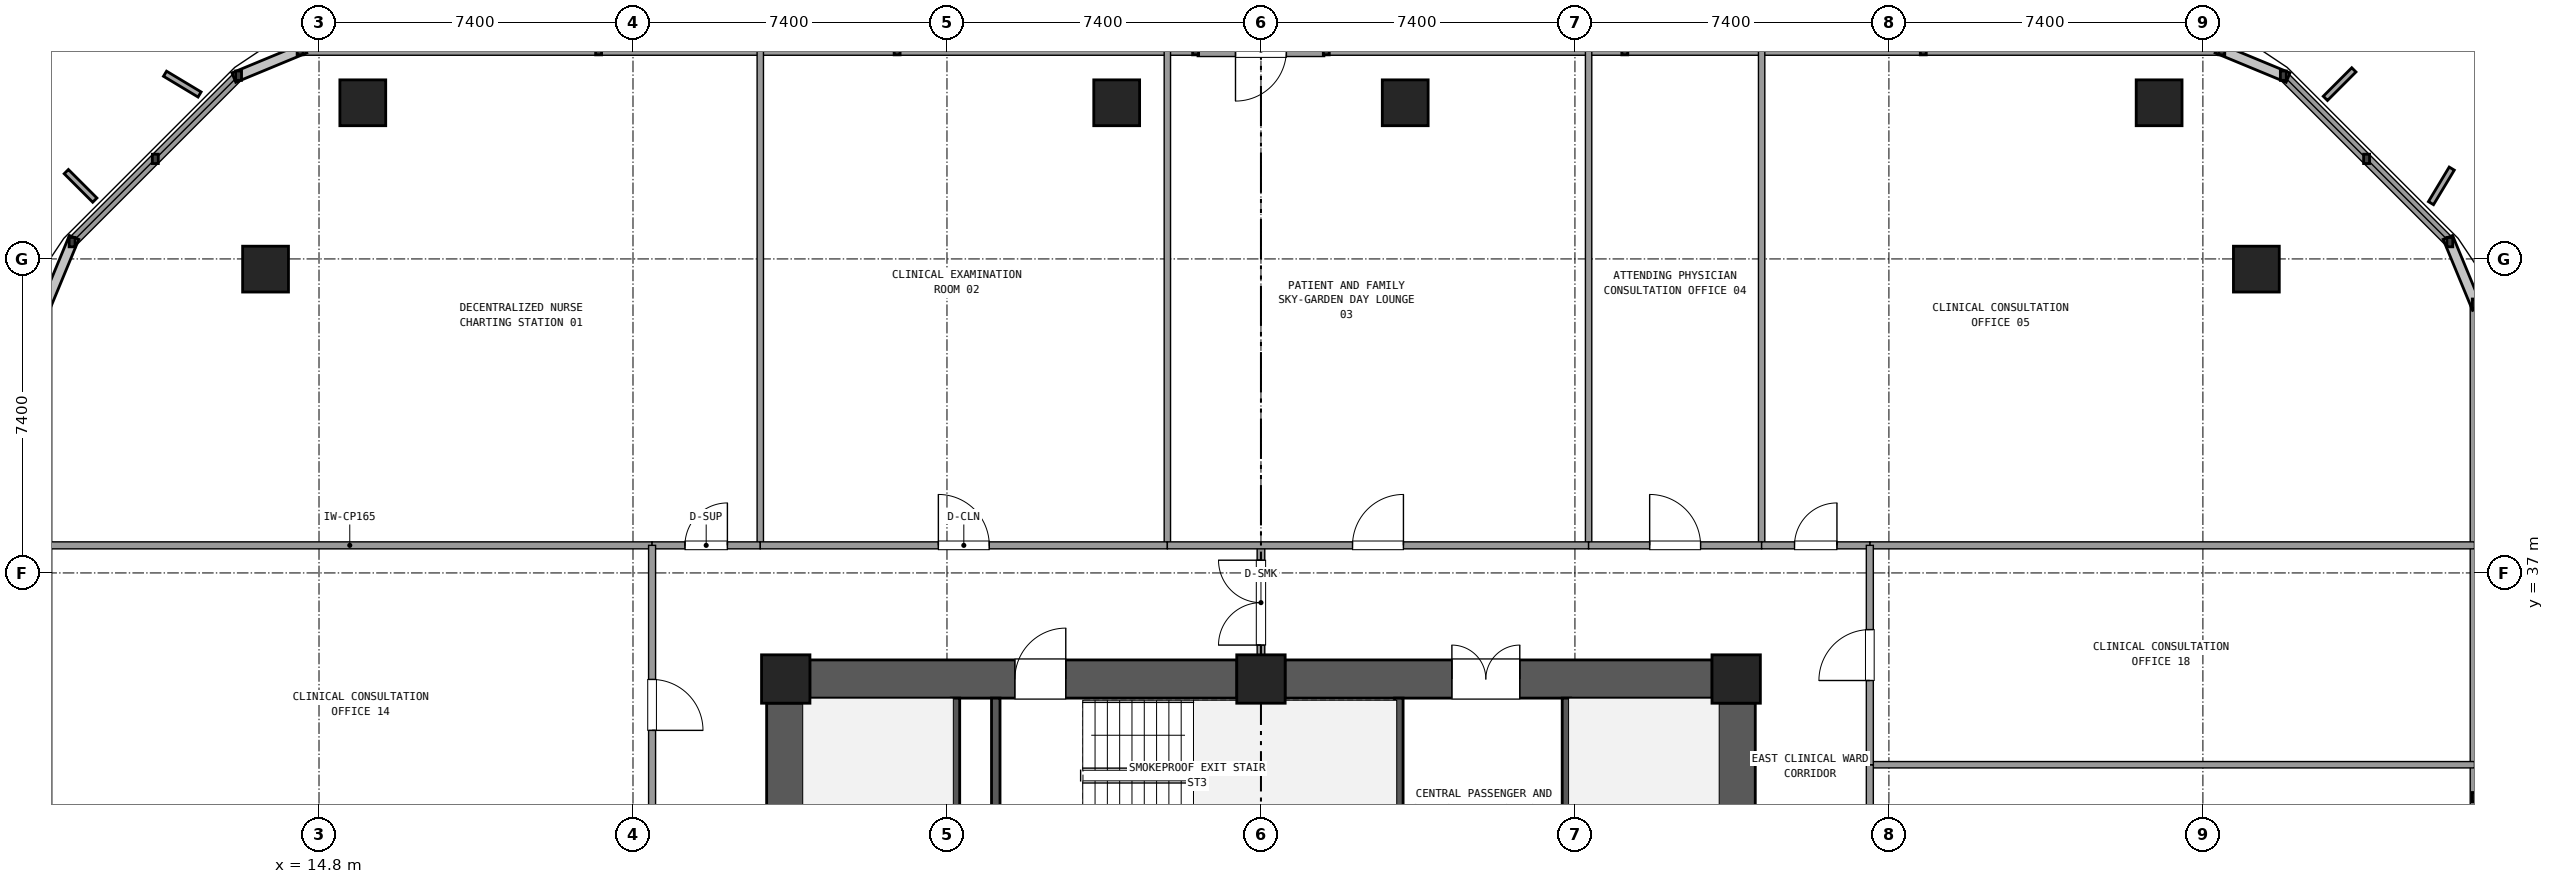
"""IFC4 building model, lengths in metres.
Left out: names, types, materials, properties, quantities, classifications, styles, units other than length and angle.
Written with IfcOpenShell. Run it as: python <this file> out.ifc"""

import sys

from ifc_helpers import new_model, si_unit, direction, frame, frame_2d, origin, origin_2d, place, context, subcontext, project, spatial, rectangle, extrude, element, fill, save


model = new_model("IFC4")
c1 = context("Model", 3, precision=1e-05, world=origin(), true_north=direction((0.0, 1.0)))
c2 = subcontext(c1, "Body", "Model", "MODEL_VIEW")
j1 = project(units=[si_unit("LENGTHUNIT", "METRE"), si_unit("PLANEANGLEUNIT", "RADIAN")], contexts=[c1])
p1 = place(None, origin())
s1 = spatial("IfcSite", under=j1, at=p1, CompositionType="ELEMENT")
p2 = place(p1, origin())
s2 = spatial("IfcBuilding", under=s1, at=p2, CompositionType="ELEMENT")
p3 = place(p2, frame((0.0, 0.0, 23.94)))
s3 = spatial("IfcBuildingStorey", under=s2, at=p3, CompositionType="ELEMENT", Elevation=23.94)
for number, where, z_axis, x_axis in (
    (1, (48.2, 34.5, 0.0), (0.0, 0.0, 1.0), (1.0, 0.0, 0.0)),
    (2, (37.0, 34.5, 0.0), (0.0, 0.0, 1.0), (1.0, 0.0, 0.0)),
    (3, (25.8, 34.5, 0.0), (0.0, 0.0, 1.0), (1.0, 0.0, 0.0)),
):
    element("IfcColumn", number, at=place(p3, frame(where, z_axis=z_axis, x_axis=x_axis)), inside=s3, PredefinedType="COLUMN", context=c2, shape_type="SweptSolid", body=[
        extrude(rectangle(XDim=1.14, YDim=1.14, at=origin_2d()), origin(), (0.0, 0.0, 1.0), 3.6),
    ])
p4 = place(p3, frame((48.2, 26.465, 0.0), z_axis=(0.0, 0.0, 1.0), x_axis=(0.0, 1.0, 0.0)))
e4 = element("IfcWall", 4, at=p4, inside=s3, PredefinedType="SHEAR", context=c2, shape_type="SweptSolid", body=[
    extrude(rectangle(XDim=7.47, YDim=0.9, at=frame_2d((3.735, 0.0))), origin(), (0.0, 0.0, 1.0), 3.32),
])
p5 = place(p3, frame((47.635, 34.5, 0.0), z_axis=(0.0, 0.0, 1.0), x_axis=(-1.0, 0.0, 0.0)))
e5 = element("IfcWall", 5, at=p5, inside=s3, PredefinedType="SHEAR", context=c2, shape_type="SweptSolid", body=[
    extrude(rectangle(XDim=10.07, YDim=0.9, at=frame_2d((5.035, 0.0))), origin(), (0.0, 0.0, 1.0), 3.32),
])
p6 = place(p5, frame((4.535, 0.0, 0.0)))
e6 = element("IfcOpeningElement", 6, at=p6, cuts=e5, PredefinedType="OPENING", context=c2, shape_type="SweptSolid", body=[
    extrude(rectangle(XDim=1.6, YDim=2.2, at=frame_2d((0.8, 1.1))), frame((0.0, 0.46, 0.0), z_axis=(0.0, -1.0, 0.0), x_axis=(1.0, 0.0, 0.0)), (0.0, 0.0, 1.0), 0.92),
])
p7 = place(p3, frame((36.435, 34.5, 0.0), z_axis=(0.0, 0.0, 1.0), x_axis=(-1.0, 0.0, 0.0)))
e7 = element("IfcWall", 7, at=p7, inside=s3, PredefinedType="SHEAR", context=c2, shape_type="SweptSolid", body=[
    extrude(rectangle(XDim=10.07, YDim=0.9, at=frame_2d((5.035, 0.0))), origin(), (0.0, 0.0, 1.0), 3.32),
])
p8 = place(p7, frame((4.035, 0.0, 0.0)))
e8 = element("IfcOpeningElement", 8, at=p8, cuts=e7, PredefinedType="OPENING", context=c2, shape_type="SweptSolid", body=[
    extrude(rectangle(XDim=1.2, YDim=2.15, at=frame_2d((0.6, 1.075))), frame((0.0, 0.46, 0.0), z_axis=(0.0, -1.0, 0.0), x_axis=(1.0, 0.0, 0.0)), (0.0, 0.0, 1.0), 0.92),
])
p9 = place(p3, frame((25.8, 33.935, 0.0), z_axis=(0.0, 0.0, 1.0), x_axis=(0.0, -1.0, 0.0)))
e9 = element("IfcWall", 9, at=p9, inside=s3, PredefinedType="SHEAR", context=c2, shape_type="SweptSolid", body=[
    extrude(rectangle(XDim=7.47, YDim=0.9, at=frame_2d((3.735, 0.0))), origin(), (0.0, 0.0, 1.0), 3.32),
])
for number, where, z_axis, x_axis in (
    (10, (60.46, 44.16, 0.0), (0.0, 0.0, 1.0), (1.0, 0.0, 0.0)),
    (11, (58.168, 48.08, 0.0), (0.0, 0.0, 1.0), (1.0, 0.0, 0.0)),
    (12, (40.4, 48.08, 0.0), (0.0, 0.0, 1.0), (1.0, 0.0, 0.0)),
    (13, (33.6, 48.08, 0.0), (0.0, 0.0, 1.0), (1.0, 0.0, 0.0)),
    (14, (15.832, 48.08, 0.0), (0.0, 0.0, 1.0), (1.0, 0.0, 0.0)),
    (15, (13.54, 44.16, 0.0), (0.0, 0.0, 1.0), (1.0, 0.0, 0.0)),
):
    element("IfcColumn", number, at=place(p3, frame(where, z_axis=z_axis, x_axis=x_axis)), inside=s3, PredefinedType="COLUMN", context=c2, shape_type="SweptSolid", body=[
        extrude(rectangle(XDim=1.08, YDim=1.08, at=origin_2d()), origin(), (0.0, 0.0, 1.0), 3.6),
    ])
p10 = place(p3, frame((65.62, 8.455, 0.0), z_axis=(0.0, 0.0, 1.0), x_axis=(0.0, 1.0, 0.0)))
e16 = element("IfcWall", 16, at=p10, inside=s3, PredefinedType="SOLIDWALL", context=c2, shape_type="SweptSolid", body=[
    extrude(rectangle(XDim=34.89, YDim=0.24, at=frame_2d((17.445, 0.0))), origin(), (0.0, 0.0, 1.0), 0.85),
])
p11 = place(p3, frame((65.019, 44.796, 0.0), z_axis=(0.0, 0.0, 1.0), x_axis=(-0.707106781187, 0.707106781187, 0.0)))
e17 = element("IfcWall", 17, at=p11, inside=s3, PredefinedType="SOLIDWALL", context=c2, shape_type="SweptSolid", body=[
    extrude(rectangle(XDim=5.548, YDim=0.24, at=frame_2d((2.774, 0.0))), origin(), (0.0, 0.0, 1.0), 0.85),
])
p12 = place(p3, frame((38.5, 49.32, 0.0), z_axis=(0.0, 0.0, 1.0), x_axis=(-1.0, 0.0, 0.0)))
e18 = element("IfcWall", 18, at=p12, inside=s3, PredefinedType="SOLIDWALL", context=c2, shape_type="SweptSolid", body=[
    extrude(rectangle(XDim=3.0, YDim=0.3, at=frame_2d((1.5, 0.0))), origin(), (0.0, 0.0, 1.0), 2.65),
])
p13 = place(p12, frame((0.9, 0.0, 0.0)))
e19 = element("IfcOpeningElement", 19, at=p13, cuts=e18, PredefinedType="OPENING", context=c2, shape_type="SweptSolid", body=[
    extrude(rectangle(XDim=1.2, YDim=2.2, at=frame_2d((0.6, 1.1))), frame((0.0, 0.16, 0.0), z_axis=(0.0, -1.0, 0.0), x_axis=(1.0, 0.0, 0.0)), (0.0, 0.0, 1.0), 0.32),
])
for number, where, z_axis, x_axis in (
    (20, (59.645, 49.32, 0.0), (0.0, 0.0, 1.0), (-1.0, 0.0, 0.0)),
    (21, (35.46, 49.32, 0.0), (0.0, 0.0, 1.0), (-1.0, 0.0, 0.0)),
):
    element("IfcWall", number, at=place(p3, frame(where, z_axis=z_axis, x_axis=x_axis)), inside=s3, PredefinedType="SOLIDWALL", context=c2, shape_type="SweptSolid", body=[
        extrude(rectangle(XDim=21.105, YDim=0.24, at=frame_2d((10.552, 0.0))), origin(), (0.0, 0.0, 1.0), 0.85),
    ])
p14 = place(p3, frame((12.904, 48.719, 0.0), z_axis=(0.0, 0.0, 1.0), x_axis=(-0.707106781187, -0.707106781187, 0.0)))
e22 = element("IfcWall", 22, at=p14, inside=s3, PredefinedType="SOLIDWALL", context=c2, shape_type="SweptSolid", body=[
    extrude(rectangle(XDim=5.548, YDim=0.24, at=frame_2d((2.774, 0.0))), origin(), (0.0, 0.0, 1.0), 0.85),
])
for number, where, z_axis, x_axis in (
    (23, (29.8, 24.65, 0.0), (0.0, 0.0, 1.0), (0.0, 1.0, 0.0)),
    (24, (44.2, 24.65, 0.0), (0.0, 0.0, 1.0), (0.0, 1.0, 0.0)),
):
    element("IfcWall", number, at=place(p3, frame(where, z_axis=z_axis, x_axis=x_axis)), inside=s3, PredefinedType="SHEAR", context=c2, shape_type="SweptSolid", body=[
        extrude(rectangle(XDim=9.4, YDim=0.2, at=frame_2d((4.7, 0.0))), origin(), (0.0, 0.0, 1.0), 3.32),
    ])
for number, where, z_axis, x_axis in (
    (25, (30.75, 30.36, 0.0), (0.0, 0.0, 1.0), (0.0, 1.0, 0.0)),
    (26, (40.25, 30.36, 0.0), (0.0, 0.0, 1.0), (0.0, 1.0, 0.0)),
):
    element("IfcWall", number, at=place(p3, frame(where, z_axis=z_axis, x_axis=x_axis)), inside=s3, PredefinedType="SHEAR", context=c2, shape_type="SweptSolid", body=[
        extrude(rectangle(XDim=3.69, YDim=0.2, at=frame_2d((1.845, 0.0))), origin(), (0.0, 0.0, 1.0), 3.32),
    ])
p15 = place(p3, frame((37.0, 34.95, 0.0), z_axis=(0.0, 0.0, 1.0), x_axis=(0.0, 1.0, 0.0)))
e27 = element("IfcWall", 27, at=p15, inside=s3, PredefinedType="PARTITIONING", context=c2, shape_type="SweptSolid", body=[
    extrude(rectangle(XDim=2.7, YDim=0.18, at=frame_2d((1.35, 0.0))), origin(), (0.0, 0.0, 1.0), 2.61),
])
p16 = place(p15, frame((0.35, 0.0, 0.0)))
e28 = element("IfcOpeningElement", 28, at=p16, cuts=e27, PredefinedType="OPENING", context=c2, shape_type="SweptSolid", body=[
    extrude(rectangle(XDim=2.0, YDim=2.2, at=frame_2d((1.0, 1.1))), frame((0.0, 0.1, 0.0), z_axis=(0.0, -1.0, 0.0), x_axis=(1.0, 0.0, 0.0)), (0.0, 0.0, 1.0), 0.2),
])
for number, where, z_axis, x_axis in (
    (29, (8.4, 37.65, 0.0), (0.0, 0.0, 1.0), (1.0, 0.0, 0.0)),
    (30, (51.35, 37.65, 0.0), (0.0, 0.0, 1.0), (1.0, 0.0, 0.0)),
):
    element("IfcWall", number, at=place(p3, frame(where, z_axis=z_axis, x_axis=x_axis)), inside=s3, PredefinedType="PARTITIONING", context=c2, shape_type="SweptSolid", body=[
        extrude(rectangle(XDim=14.25, YDim=0.165, at=frame_2d((7.125, 0.0))), origin(), (0.0, 0.0, 1.0), 2.61),
    ])
p17 = place(p3, frame((25.2, 37.65, 0.0), z_axis=(0.0, 0.0, 1.0), x_axis=(0.0, 1.0, 0.0)))
e31 = element("IfcWall", 31, at=p17, inside=s3, PredefinedType="PARTITIONING", context=c2, shape_type="SweptSolid", body=[
    extrude(rectangle(XDim=11.65, YDim=0.15, at=frame_2d((5.825, 0.0))), origin(), (0.0, 0.0, 1.0), 2.61),
])
p18 = place(p3, frame((22.65, 37.65, 0.0), z_axis=(0.0, 0.0, 1.0), x_axis=(1.0, 0.0, 0.0)))
e32 = element("IfcWall", 32, at=p18, inside=s3, PredefinedType="PARTITIONING", context=c2, shape_type="SweptSolid", body=[
    extrude(rectangle(XDim=2.55, YDim=0.165, at=frame_2d((1.275, 0.0))), origin(), (0.0, 0.0, 1.0), 2.61),
])
p19 = place(p18, frame((0.775, 0.0, 0.0)))
e33 = element("IfcOpeningElement", 33, at=p19, cuts=e32, PredefinedType="OPENING", context=c2, shape_type="SweptSolid", body=[
    extrude(rectangle(XDim=1.0, YDim=2.15, at=frame_2d((0.5, 1.075))), frame((0.0, 0.093, 0.0), z_axis=(0.0, -1.0, 0.0), x_axis=(1.0, 0.0, 0.0)), (0.0, 0.0, 1.0), 0.185),
])
p20 = place(p3, frame((34.794, 37.65, 0.0), z_axis=(0.0, 0.0, 1.0), x_axis=(0.0, 1.0, 0.0)))
e34 = element("IfcWall", 34, at=p20, inside=s3, PredefinedType="PARTITIONING", context=c2, shape_type="SweptSolid", body=[
    extrude(rectangle(XDim=11.65, YDim=0.15, at=frame_2d((5.825, 0.0))), origin(), (0.0, 0.0, 1.0), 2.61),
])
p21 = place(p3, frame((25.2, 37.65, 0.0), z_axis=(0.0, 0.0, 1.0), x_axis=(1.0, 0.0, 0.0)))
e35 = element("IfcWall", 35, at=p21, inside=s3, PredefinedType="PARTITIONING", context=c2, shape_type="SweptSolid", body=[
    extrude(rectangle(XDim=9.594, YDim=0.165, at=frame_2d((4.797, 0.0))), origin(), (0.0, 0.0, 1.0), 2.61),
])
p22 = place(p21, frame((4.197, 0.0, 0.0)))
e36 = element("IfcOpeningElement", 36, at=p22, cuts=e35, PredefinedType="OPENING", context=c2, shape_type="SweptSolid", body=[
    extrude(rectangle(XDim=1.2, YDim=2.15, at=frame_2d((0.6, 1.075))), frame((0.0, 0.093, 0.0), z_axis=(0.0, -1.0, 0.0), x_axis=(1.0, 0.0, 0.0)), (0.0, 0.0, 1.0), 0.185),
])
p23 = place(p3, frame((44.722, 37.65, 0.0), z_axis=(0.0, 0.0, 1.0), x_axis=(0.0, 1.0, 0.0)))
e37 = element("IfcWall", 37, at=p23, inside=s3, PredefinedType="PARTITIONING", context=c2, shape_type="SweptSolid", body=[
    extrude(rectangle(XDim=11.65, YDim=0.15, at=frame_2d((5.825, 0.0))), origin(), (0.0, 0.0, 1.0), 2.61),
])
p24 = place(p3, frame((34.794, 37.65, 0.0), z_axis=(0.0, 0.0, 1.0), x_axis=(1.0, 0.0, 0.0)))
e38 = element("IfcWall", 38, at=p24, inside=s3, PredefinedType="PARTITIONING", context=c2, shape_type="SweptSolid", body=[
    extrude(rectangle(XDim=9.928, YDim=0.165, at=frame_2d((4.964, 0.0))), origin(), (0.0, 0.0, 1.0), 2.61),
])
p25 = place(p24, frame((4.364, 0.0, 0.0)))
e39 = element("IfcOpeningElement", 39, at=p25, cuts=e38, PredefinedType="OPENING", context=c2, shape_type="SweptSolid", body=[
    extrude(rectangle(XDim=1.2, YDim=2.15, at=frame_2d((0.6, 1.075))), frame((0.0, 0.093, 0.0), z_axis=(0.0, -1.0, 0.0), x_axis=(1.0, 0.0, 0.0)), (0.0, 0.0, 1.0), 0.185),
])
p26 = place(p3, frame((48.8, 37.65, 0.0), z_axis=(0.0, 0.0, 1.0), x_axis=(0.0, 1.0, 0.0)))
e40 = element("IfcWall", 40, at=p26, inside=s3, PredefinedType="PARTITIONING", context=c2, shape_type="SweptSolid", body=[
    extrude(rectangle(XDim=11.65, YDim=0.15, at=frame_2d((5.825, 0.0))), origin(), (0.0, 0.0, 1.0), 2.61),
])
p27 = place(p3, frame((44.722, 37.65, 0.0), z_axis=(0.0, 0.0, 1.0), x_axis=(1.0, 0.0, 0.0)))
e41 = element("IfcWall", 41, at=p27, inside=s3, PredefinedType="PARTITIONING", context=c2, shape_type="SweptSolid", body=[
    extrude(rectangle(XDim=4.078, YDim=0.165, at=frame_2d((2.039, 0.0))), origin(), (0.0, 0.0, 1.0), 2.61),
])
p28 = place(p27, frame((1.439, 0.0, 0.0)))
e42 = element("IfcOpeningElement", 42, at=p28, cuts=e41, PredefinedType="OPENING", context=c2, shape_type="SweptSolid", body=[
    extrude(rectangle(XDim=1.2, YDim=2.15, at=frame_2d((0.6, 1.075))), frame((0.0, 0.093, 0.0), z_axis=(0.0, -1.0, 0.0), x_axis=(1.0, 0.0, 0.0)), (0.0, 0.0, 1.0), 0.185),
])
p29 = place(p3, frame((48.8, 37.65, 0.0), z_axis=(0.0, 0.0, 1.0), x_axis=(1.0, 0.0, 0.0)))
e43 = element("IfcWall", 43, at=p29, inside=s3, PredefinedType="PARTITIONING", context=c2, shape_type="SweptSolid", body=[
    extrude(rectangle(XDim=2.55, YDim=0.165, at=frame_2d((1.275, 0.0))), origin(), (0.0, 0.0, 1.0), 2.61),
])
p30 = place(p29, frame((0.775, 0.0, 0.0)))
e44 = element("IfcOpeningElement", 44, at=p30, cuts=e43, PredefinedType="OPENING", context=c2, shape_type="SweptSolid", body=[
    extrude(rectangle(XDim=1.0, YDim=2.15, at=frame_2d((0.5, 1.075))), frame((0.0, 0.093, 0.0), z_axis=(0.0, -1.0, 0.0), x_axis=(1.0, 0.0, 0.0)), (0.0, 0.0, 1.0), 0.185),
])
p31 = place(p3, frame((22.65, 30.13, 0.0), z_axis=(0.0, 0.0, 1.0), x_axis=(0.0, 1.0, 0.0)))
e45 = element("IfcWall", 45, at=p31, inside=s3, PredefinedType="PARTITIONING", context=c2, shape_type="SweptSolid", body=[
    extrude(rectangle(XDim=7.52, YDim=0.165, at=frame_2d((3.76, 0.0))), origin(), (0.0, 0.0, 1.0), 2.61),
])
p32 = place(p31, frame((3.16, 0.0, 0.0)))
e46 = element("IfcOpeningElement", 46, at=p32, cuts=e45, PredefinedType="OPENING", context=c2, shape_type="SweptSolid", body=[
    extrude(rectangle(XDim=1.2, YDim=2.15, at=frame_2d((0.6, 1.075))), frame((0.0, 0.093, 0.0), z_axis=(0.0, -1.0, 0.0), x_axis=(1.0, 0.0, 0.0)), (0.0, 0.0, 1.0), 0.185),
])
p33 = place(p3, frame((51.35, 32.48, 0.0), z_axis=(0.0, 0.0, 1.0), x_axis=(1.0, 0.0, 0.0)))
e47 = element("IfcWall", 47, at=p33, inside=s3, PredefinedType="PARTITIONING", context=c2, shape_type="SweptSolid", body=[
    extrude(rectangle(XDim=14.25, YDim=0.15, at=frame_2d((7.125, 0.0))), origin(), (0.0, 0.0, 1.0), 2.61),
])
p34 = place(p3, frame((51.35, 26.84, 0.0), z_axis=(0.0, 0.0, 1.0), x_axis=(0.0, 1.0, 0.0)))
e48 = element("IfcWall", 48, at=p34, inside=s3, PredefinedType="PARTITIONING", context=c2, shape_type="SweptSolid", body=[
    extrude(rectangle(XDim=5.64, YDim=0.165, at=frame_2d((2.82, 0.0))), origin(), (0.0, 0.0, 1.0), 2.61),
])
p35 = place(p34, frame((2.22, 0.0, 0.0)))
e49 = element("IfcOpeningElement", 49, at=p35, cuts=e48, PredefinedType="OPENING", context=c2, shape_type="SweptSolid", body=[
    extrude(rectangle(XDim=1.2, YDim=2.15, at=frame_2d((0.6, 1.075))), frame((0.0, 0.093, 0.0), z_axis=(0.0, -1.0, 0.0), x_axis=(1.0, 0.0, 0.0)), (0.0, 0.0, 1.0), 0.185),
])
p36 = place(p3, frame((51.35, 32.48, 0.0), z_axis=(0.0, 0.0, 1.0), x_axis=(0.0, 1.0, 0.0)))
e50 = element("IfcWall", 50, at=p36, inside=s3, PredefinedType="PARTITIONING", context=c2, shape_type="SweptSolid", body=[
    extrude(rectangle(XDim=5.17, YDim=0.165, at=frame_2d((2.585, 0.0))), origin(), (0.0, 0.0, 1.0), 2.61),
])
p37 = place(p36, frame((1.985, 0.0, 0.0)))
e51 = element("IfcOpeningElement", 51, at=p37, cuts=e50, PredefinedType="OPENING", context=c2, shape_type="SweptSolid", body=[
    extrude(rectangle(XDim=1.2, YDim=2.15, at=frame_2d((0.6, 1.075))), frame((0.0, 0.093, 0.0), z_axis=(0.0, -1.0, 0.0), x_axis=(1.0, 0.0, 0.0)), (0.0, 0.0, 1.0), 0.185),
])
p38 = place(p6, frame((1.6, 0.0, 0.0), z_axis=(0.0, 0.0, 1.0), x_axis=(-1.0, 0.0, 0.0)))
e52 = element("IfcDoor", 52, at=p38, inside=s3, OperationType="DOUBLE_DOOR_SINGLE_SWING", PredefinedType="DOOR", context=c2, shape_type="SweptSolid", body=[
    extrude(rectangle(XDim=1.6, YDim=2.2, at=frame_2d((0.8, 1.1))), frame((0.0, 0.025, 0.0), z_axis=(0.0, -1.0, 0.0), x_axis=(1.0, 0.0, 0.0)), (0.0, 0.0, 1.0), 0.05),
])
fill(e6, e52)
p39 = place(p8, frame((1.2, 0.0, 0.0), z_axis=(0.0, 0.0, 1.0), x_axis=(-1.0, 0.0, 0.0)))
e53 = element("IfcDoor", 53, at=p39, inside=s3, OperationType="SINGLE_SWING_LEFT", PredefinedType="DOOR", context=c2, shape_type="SweptSolid", body=[
    extrude(rectangle(XDim=1.2, YDim=2.15, at=frame_2d((0.6, 1.075))), frame((0.0, 0.025, 0.0), z_axis=(0.0, -1.0, 0.0), x_axis=(1.0, 0.0, 0.0)), (0.0, 0.0, 1.0), 0.05),
])
fill(e8, e53)
p40 = place(p16, origin())
e54 = element("IfcDoor", 54, at=p40, inside=s3, OperationType="DOUBLE_DOOR_SINGLE_SWING", PredefinedType="DOOR", context=c2, shape_type="SweptSolid", body=[
    extrude(rectangle(XDim=2.0, YDim=2.2, at=frame_2d((1.0, 1.1))), frame((0.0, 0.025, 0.0), z_axis=(0.0, -1.0, 0.0), x_axis=(1.0, 0.0, 0.0)), (0.0, 0.0, 1.0), 0.05),
])
fill(e28, e54)
p41 = place(p19, origin())
e55 = element("IfcDoor", 55, at=p41, inside=s3, OperationType="SINGLE_SWING_RIGHT", PredefinedType="DOOR", context=c2, shape_type="SweptSolid", body=[
    extrude(rectangle(XDim=1.0, YDim=2.15, at=frame_2d((0.5, 1.075))), frame((0.0, 0.025, 0.0), z_axis=(0.0, -1.0, 0.0), x_axis=(1.0, 0.0, 0.0)), (0.0, 0.0, 1.0), 0.05),
])
fill(e33, e55)
p42 = place(p22, origin())
e56 = element("IfcDoor", 56, at=p42, inside=s3, OperationType="SINGLE_SWING_LEFT", PredefinedType="DOOR", context=c2, shape_type="SweptSolid", body=[
    extrude(rectangle(XDim=1.2, YDim=2.15, at=frame_2d((0.6, 1.075))), frame((0.0, 0.025, 0.0), z_axis=(0.0, -1.0, 0.0), x_axis=(1.0, 0.0, 0.0)), (0.0, 0.0, 1.0), 0.05),
])
fill(e36, e56)
p43 = place(p25, origin())
e57 = element("IfcDoor", 57, at=p43, inside=s3, OperationType="SINGLE_SWING_RIGHT", PredefinedType="DOOR", context=c2, shape_type="SweptSolid", body=[
    extrude(rectangle(XDim=1.2, YDim=2.15, at=frame_2d((0.6, 1.075))), frame((0.0, 0.025, 0.0), z_axis=(0.0, -1.0, 0.0), x_axis=(1.0, 0.0, 0.0)), (0.0, 0.0, 1.0), 0.05),
])
fill(e39, e57)
p44 = place(p28, origin())
e58 = element("IfcDoor", 58, at=p44, inside=s3, OperationType="SINGLE_SWING_LEFT", PredefinedType="DOOR", context=c2, shape_type="SweptSolid", body=[
    extrude(rectangle(XDim=1.2, YDim=2.15, at=frame_2d((0.6, 1.075))), frame((0.0, 0.025, 0.0), z_axis=(0.0, -1.0, 0.0), x_axis=(1.0, 0.0, 0.0)), (0.0, 0.0, 1.0), 0.05),
])
fill(e42, e58)
p45 = place(p30, origin())
e59 = element("IfcDoor", 59, at=p45, inside=s3, OperationType="SINGLE_SWING_RIGHT", PredefinedType="DOOR", context=c2, shape_type="SweptSolid", body=[
    extrude(rectangle(XDim=1.0, YDim=2.15, at=frame_2d((0.5, 1.075))), frame((0.0, 0.025, 0.0), z_axis=(0.0, -1.0, 0.0), x_axis=(1.0, 0.0, 0.0)), (0.0, 0.0, 1.0), 0.05),
])
fill(e44, e59)
p46 = place(p32, frame((1.2, 0.0, 0.0), z_axis=(0.0, 0.0, 1.0), x_axis=(-1.0, 0.0, 0.0)))
e60 = element("IfcDoor", 60, at=p46, inside=s3, OperationType="SINGLE_SWING_LEFT", PredefinedType="DOOR", context=c2, shape_type="SweptSolid", body=[
    extrude(rectangle(XDim=1.2, YDim=2.15, at=frame_2d((0.6, 1.075))), frame((0.0, 0.025, 0.0), z_axis=(0.0, -1.0, 0.0), x_axis=(1.0, 0.0, 0.0)), (0.0, 0.0, 1.0), 0.05),
])
fill(e46, e60)
p47 = place(p37, origin())
e61 = element("IfcDoor", 61, at=p47, inside=s3, OperationType="SINGLE_SWING_LEFT", PredefinedType="DOOR", context=c2, shape_type="SweptSolid", body=[
    extrude(rectangle(XDim=1.2, YDim=2.15, at=frame_2d((0.6, 1.075))), frame((0.0, 0.025, 0.0), z_axis=(0.0, -1.0, 0.0), x_axis=(1.0, 0.0, 0.0)), (0.0, 0.0, 1.0), 0.05),
])
fill(e51, e61)
save(model, sys.argv[1])
